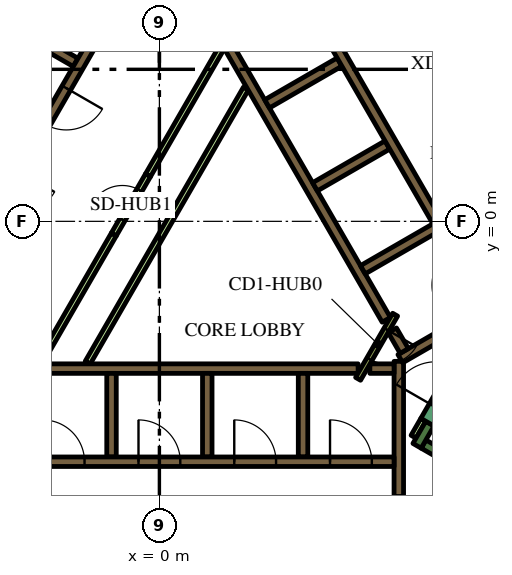
"""IFC4 building model, lengths in metres.
Left out: names, types, materials, properties, quantities, classifications, styles, units other than length and angle.
Written with IfcOpenShell. Run it as: python <this file> out.ifc"""

import sys

from ifc_helpers import new_model, si_unit, direction, frame, frame_2d, origin, place, context, subcontext, project, spatial, rectangle, extrude, element, fill, save


model = new_model("IFC4")
c1 = context("Model", 3, precision=1e-05, world=origin(), true_north=direction((0.0, 1.0)))
c2 = subcontext(c1, "Body", "Model", "MODEL_VIEW")
j1 = project(units=[si_unit("LENGTHUNIT", "METRE"), si_unit("PLANEANGLEUNIT", "RADIAN")], contexts=[c1])
p1 = place(None, origin())
s1 = spatial("IfcSite", under=j1, at=p1, CompositionType="ELEMENT")
p2 = place(p1, origin())
s2 = spatial("IfcBuilding", under=s1, at=p2, CompositionType="ELEMENT")
p3 = place(p2, frame((0.0, 0.0, 145.8)))
s3 = spatial("IfcBuildingStorey", under=s2, at=p3, CompositionType="ELEMENT", Elevation=145.8)
p4 = place(p3, frame((12.84, -9.261, 0.0), z_axis=(0.0, 0.0, 1.0), x_axis=(-0.866013990052, 0.500019768644, 0.0)))
e1 = element("IfcWall", 1, at=p4, inside=s3, PredefinedType="SOLIDWALL", context=c2, shape_type="SweptSolid", body=[
    extrude(rectangle(XDim=6.8, YDim=0.25, at=frame_2d((3.4, 0.0))), origin(), (0.0, 0.0, 1.0), 4.2),
])
p5 = place(p3, frame((6.78, -5.906, 0.0), z_axis=(0.0, 0.0, 1.0), x_axis=(0.500223362819, 0.865896406789, 0.0)))
e2 = element("IfcWall", 2, at=p5, inside=s3, PredefinedType="SOLIDWALL", context=c2, shape_type="SweptSolid", body=[
    extrude(rectangle(XDim=0.675, YDim=0.25, at=frame_2d((0.337, 0.0))), origin(), (0.0, 0.0, 1.0), 4.2),
])
p6 = place(p3, frame((-5.259, -3.875, 0.0), z_axis=(0.0, 0.0, 1.0), x_axis=(1.0, 0.0, 0.0)))
e3 = element("IfcWall", 3, at=p6, inside=s3, PredefinedType="SOLIDWALL", context=c2, shape_type="SweptSolid", body=[
    extrude(rectangle(XDim=10.489, YDim=0.25, at=frame_2d((5.244, 0.0))), origin(), (0.0, 0.0, 1.0), 4.2),
])
for number, where, z_axis, x_axis in (
    (4, (3.78, -4.0, 0.0), (0.0, 0.0, 1.0), (0.0, -1.0, 0.0)),
    (5, (1.26, -4.0, 0.0), (0.0, 0.0, 1.0), (0.0, -1.0, 0.0)),
    (6, (-1.26, -4.0, 0.0), (0.0, 0.0, 1.0), (0.0, -1.0, 0.0)),
):
    element("IfcWall", number, at=place(p3, frame(where, z_axis=z_axis, x_axis=x_axis)), inside=s3, PredefinedType="SOLIDWALL", context=c2, shape_type="SweptSolid", body=[
        extrude(rectangle(XDim=2.2, YDim=0.25, at=frame_2d((1.1, 0.0))), origin(), (0.0, 0.0, 1.0), 4.2),
    ])
p7 = place(p3, frame((6.3, -7.24, 0.0), z_axis=(0.0, 0.0, 1.0), x_axis=(0.0, 1.0, 0.0)))
e7 = element("IfcWall", 7, at=p7, inside=s3, PredefinedType="SOLIDWALL", context=c2, shape_type="SweptSolid", body=[
    extrude(rectangle(XDim=3.556, YDim=0.25, at=frame_2d((1.778, 0.0))), origin(), (0.0, 0.0, 1.0), 4.2),
])
p8 = place(p3, frame((5.538, -3.875, 0.0), z_axis=(0.0, 0.0, 1.0), x_axis=(1.0, 0.0, 0.0)))
e8 = element("IfcWall", 8, at=p8, inside=s3, PredefinedType="SOLIDWALL", context=c2, shape_type="SweptSolid", body=[
    extrude(rectangle(XDim=0.637, YDim=0.25, at=frame_2d((0.318, 0.0))), origin(), (0.0, 0.0, 1.0), 4.2),
])
p9 = place(p3, frame((9.19, -1.969, 0.0), z_axis=(0.0, 0.0, 1.0), x_axis=(-0.866057109641, -0.499945079824, 0.0)))
e9 = element("IfcWall", 9, at=p9, inside=s3, PredefinedType="SOLIDWALL", context=c2, shape_type="SweptSolid", body=[
    extrude(rectangle(XDim=3.291, YDim=0.25, at=frame_2d((1.646, 0.0))), origin(), (0.0, 0.0, 1.0), 4.2),
])
p10 = place(p3, frame((6.13, -2.867, 0.0), z_axis=(0.0, 0.0, 1.0), x_axis=(0.500160776593, -0.865932559475, 0.0)))
e10 = element("IfcWall", 10, at=p10, inside=s3, PredefinedType="SOLIDWALL", context=c2, shape_type="SweptSolid", body=[
    extrude(rectangle(XDim=0.627, YDim=0.25, at=frame_2d((0.313, 0.0))), origin(), (0.0, 0.0, 1.0), 4.2),
])
p11 = place(p3, frame((5.97, -2.591, 0.0), z_axis=(0.0, 0.0, 1.0), x_axis=(-0.499994469932, 0.866028596547, 0.0)))
e11 = element("IfcWall", 11, at=p11, inside=s3, PredefinedType="SOLIDWALL", context=c2, shape_type="SweptSolid", body=[
    extrude(rectangle(XDim=10.488, YDim=0.25, at=frame_2d((5.244, 0.0))), origin(), (0.0, 0.0, 1.0), 4.2),
])
for number, where, z_axis, x_axis in (
    (12, (2.834, 3.091, 0.0), (0.0, 0.0, 1.0), (0.866, 0.5, 0.0)),
    (13, (4.094, 0.909, 0.0), (0.0, 0.0, 1.0), (0.866, 0.5, 0.0)),
    (14, (5.354, -1.274, 0.0), (0.0, 0.0, 1.0), (0.866, 0.5, 0.0)),
):
    element("IfcWall", number, at=place(p3, frame(where, z_axis=z_axis, x_axis=x_axis)), inside=s3, PredefinedType="SOLIDWALL", context=c2, shape_type="SweptSolid", body=[
        extrude(rectangle(XDim=2.2, YDim=0.25, at=frame_2d((1.1, 0.0))), origin(), (0.0, 0.0, 1.0), 4.2),
    ])
p12 = place(p3, frame((-8.06, -1.311, 0.0), z_axis=(0.0, 0.0, 1.0), x_axis=(0.50000273126, 0.866023826885, 0.0)))
e15 = element("IfcWall", 15, at=p12, inside=s3, PredefinedType="SOLIDWALL", context=c2, shape_type="SweptSolid", body=[
    extrude(rectangle(XDim=10.33, YDim=0.25, at=frame_2d((5.165, 0.0))), origin(), (0.0, 0.0, 1.0), 4.2),
])
p13 = place(p3, frame((-2.204, 4.182, 0.0), z_axis=(0.0, 0.0, 1.0), x_axis=(-0.866008176907, 0.50002983664, 0.0)))
e16 = element("IfcWall", 16, at=p13, inside=s3, PredefinedType="SOLIDWALL", context=c2, shape_type="SweptSolid", body=[
    extrude(rectangle(XDim=2.2, YDim=0.25, at=frame_2d((1.1, 0.0))), origin(), (0.0, 0.0, 1.0), 4.2),
])
p14 = place(p3, frame((6.945, -5.222, 0.0), z_axis=(0.0, 0.0, 1.0), x_axis=(-0.499818422106, -0.866130212453, 0.0)))
e17 = element("IfcWall", 17, at=p14, inside=s3, PredefinedType="PARTITIONING", context=c2, shape_type="SweptSolid", body=[
    extrude(rectangle(XDim=0.514, YDim=0.15, at=frame_2d((0.257, 0.0))), origin(), (0.0, 0.0, 1.0), 3.15),
])
p15 = place(p3, frame((-1.887, -3.718, 0.0), z_axis=(0.0, 0.0, 1.0), x_axis=(0.500005008002, 0.866022512394, 0.0)))
e18 = element("IfcWall", 18, at=p15, inside=s3, PredefinedType="PARTITIONING", context=c2, shape_type="SweptSolid", body=[
    extrude(rectangle(XDim=8.327, YDim=0.15, at=frame_2d((4.164, 0.0))), origin(), (0.0, 0.0, 1.0), 3.15),
])
p16 = place(p3, frame((-3.147, -3.718, 0.0), z_axis=(0.0, 0.0, 1.0), x_axis=(0.500010131483, 0.866019554291, 0.0)))
e19 = element("IfcWall", 19, at=p16, inside=s3, PredefinedType="PARTITIONING", context=c2, shape_type="SweptSolid", body=[
    extrude(rectangle(XDim=3.894, YDim=0.15, at=frame_2d((1.947, 0.0))), origin(), (0.0, 0.0, 1.0), 3.15),
])
p17 = place(p3, frame((-0.3, 1.212, 0.0), z_axis=(0.0, 0.0, 1.0), x_axis=(0.499963101113, 0.866046706318, 0.0)))
e20 = element("IfcWall", 20, at=p17, inside=s3, PredefinedType="PARTITIONING", context=c2, shape_type="SweptSolid", body=[
    extrude(rectangle(XDim=3.893, YDim=0.15, at=frame_2d((1.947, 0.0))), origin(), (0.0, 0.0, 1.0), 3.15),
])
p18 = place(p3, frame((-6.175, -6.325, 0.0), z_axis=(0.0, 0.0, 1.0), x_axis=(1.0, 0.0, 0.0)))
e21 = element("IfcWall", 21, at=p18, inside=s3, PredefinedType="SOLIDWALL", context=c2, shape_type="SweptSolid", body=[
    extrude(rectangle(XDim=12.35, YDim=0.25, at=frame_2d((6.175, 0.0))), origin(), (0.0, 0.0, 1.0), 4.2),
])
p19 = place(p18, frame((0.585, 0.0, 0.0)))
e22 = element("IfcOpeningElement", 22, at=p19, cuts=e21, PredefinedType="OPENING", context=c2, shape_type="SweptSolid", body=[
    extrude(rectangle(XDim=1.1, YDim=2.1, at=frame_2d((0.55, 1.05))), frame((0.0, 0.135, 0.0), z_axis=(0.0, -1.0, 0.0), x_axis=(1.0, 0.0, 0.0)), (0.0, 0.0, 1.0), 0.27),
])
p20 = place(p18, frame((3.105, 0.0, 0.0)))
e23 = element("IfcOpeningElement", 23, at=p20, cuts=e21, PredefinedType="OPENING", context=c2, shape_type="SweptSolid", body=[
    extrude(rectangle(XDim=1.1, YDim=2.1, at=frame_2d((0.55, 1.05))), frame((0.0, 0.135, 0.0), z_axis=(0.0, -1.0, 0.0), x_axis=(1.0, 0.0, 0.0)), (0.0, 0.0, 1.0), 0.27),
])
p21 = place(p18, frame((5.625, 0.0, 0.0)))
e24 = element("IfcOpeningElement", 24, at=p21, cuts=e21, PredefinedType="OPENING", context=c2, shape_type="SweptSolid", body=[
    extrude(rectangle(XDim=1.1, YDim=2.1, at=frame_2d((0.55, 1.05))), frame((0.0, 0.135, 0.0), z_axis=(0.0, -1.0, 0.0), x_axis=(1.0, 0.0, 0.0)), (0.0, 0.0, 1.0), 0.27),
])
p22 = place(p18, frame((8.145, 0.0, 0.0)))
e25 = element("IfcOpeningElement", 25, at=p22, cuts=e21, PredefinedType="OPENING", context=c2, shape_type="SweptSolid", body=[
    extrude(rectangle(XDim=1.1, YDim=2.1, at=frame_2d((0.55, 1.05))), frame((0.0, 0.135, 0.0), z_axis=(0.0, -1.0, 0.0), x_axis=(1.0, 0.0, 0.0)), (0.0, 0.0, 1.0), 0.27),
])
p23 = place(p18, frame((10.665, 0.0, 0.0)))
e26 = element("IfcOpeningElement", 26, at=p23, cuts=e21, PredefinedType="OPENING", context=c2, shape_type="SweptSolid", body=[
    extrude(rectangle(XDim=1.1, YDim=2.1, at=frame_2d((0.55, 1.05))), frame((0.0, 0.135, 0.0), z_axis=(0.0, -1.0, 0.0), x_axis=(1.0, 0.0, 0.0)), (0.0, 0.0, 1.0), 0.27),
])
p24 = place(p3, frame((8.565, -2.185, 0.0), z_axis=(0.0, 0.0, 1.0), x_axis=(-0.499997954832, 0.866026584559, 0.0)))
e27 = element("IfcWall", 27, at=p24, inside=s3, PredefinedType="SOLIDWALL", context=c2, shape_type="SweptSolid", body=[
    extrude(rectangle(XDim=12.35, YDim=0.25, at=frame_2d((6.175, 0.0))), origin(), (0.0, 0.0, 1.0), 4.2),
])
p25 = place(p24, frame((0.585, 0.0, 0.0)))
e28 = element("IfcOpeningElement", 28, at=p25, cuts=e27, PredefinedType="OPENING", context=c2, shape_type="SweptSolid", body=[
    extrude(rectangle(XDim=1.1, YDim=2.1, at=frame_2d((0.55, 1.05))), frame((0.0, 0.135, 0.0), z_axis=(0.0, -1.0, 0.0), x_axis=(1.0, 0.0, 0.0)), (0.0, 0.0, 1.0), 0.27),
])
p26 = place(p3, frame((-0.898, 6.194, 0.0), z_axis=(0.0, 0.0, 1.0), x_axis=(-0.499996202215, -0.866027596426, 0.0)))
e29 = element("IfcWall", 29, at=p26, inside=s3, PredefinedType="SOLIDWALL", context=c2, shape_type="SweptSolid", body=[
    extrude(rectangle(XDim=9.83, YDim=0.25, at=frame_2d((4.915, 0.0))), origin(), (0.0, 0.0, 1.0), 4.2),
])
p27 = place(p26, frame((0.585, 0.0, 0.0)))
e30 = element("IfcOpeningElement", 30, at=p27, cuts=e29, PredefinedType="OPENING", context=c2, shape_type="SweptSolid", body=[
    extrude(rectangle(XDim=1.1, YDim=2.1, at=frame_2d((0.55, 1.05))), frame((0.0, 0.135, 0.0), z_axis=(0.0, -1.0, 0.0), x_axis=(1.0, 0.0, 0.0)), (0.0, 0.0, 1.0), 0.27),
])
p28 = place(p26, frame((3.105, 0.0, 0.0)))
e31 = element("IfcOpeningElement", 31, at=p28, cuts=e29, PredefinedType="OPENING", context=c2, shape_type="SweptSolid", body=[
    extrude(rectangle(XDim=1.1, YDim=2.1, at=frame_2d((0.55, 1.05))), frame((0.0, 0.135, 0.0), z_axis=(0.0, -1.0, 0.0), x_axis=(1.0, 0.0, 0.0)), (0.0, 0.0, 1.0), 0.27),
])
p29 = place(p26, frame((5.625, 0.0, 0.0)))
e32 = element("IfcOpeningElement", 32, at=p29, cuts=e29, PredefinedType="OPENING", context=c2, shape_type="SweptSolid", body=[
    extrude(rectangle(XDim=1.1, YDim=2.1, at=frame_2d((0.55, 1.05))), frame((0.0, 0.135, 0.0), z_axis=(0.0, -1.0, 0.0), x_axis=(1.0, 0.0, 0.0)), (0.0, 0.0, 1.0), 0.27),
])
p30 = place(p26, frame((8.145, 0.0, 0.0)))
e33 = element("IfcOpeningElement", 33, at=p30, cuts=e29, PredefinedType="OPENING", context=c2, shape_type="SweptSolid", body=[
    extrude(rectangle(XDim=1.1, YDim=2.1, at=frame_2d((0.55, 1.05))), frame((0.0, 0.135, 0.0), z_axis=(0.0, -1.0, 0.0), x_axis=(1.0, 0.0, 0.0)), (0.0, 0.0, 1.0), 0.27),
])
p31 = place(p3, frame((7.053, -5.284, 0.0), z_axis=(0.0, 0.0, 1.0), x_axis=(0.500078061341, 0.865980330357, 0.0)))
e34 = element("IfcWall", 34, at=p31, inside=s3, PredefinedType="SOLIDWALL", context=c2, shape_type="SweptSolid", body=[
    extrude(rectangle(XDim=2.1, YDim=0.4, at=frame_2d((1.05, 0.0))), origin(), (0.0, 0.0, 1.0), 4.2),
])
p32 = place(p31, frame((0.45, 0.0, 0.0)))
e35 = element("IfcOpeningElement", 35, at=p32, cuts=e34, PredefinedType="OPENING", context=c2, shape_type="SweptSolid", body=[
    extrude(rectangle(XDim=1.2, YDim=2.1, at=frame_2d((0.6, 1.05))), frame((0.0, 0.21, 0.0), z_axis=(0.0, -1.0, 0.0), x_axis=(1.0, 0.0, 0.0)), (0.0, 0.0, 1.0), 0.42),
])
p33 = place(p3, frame((6.203, -2.456, 0.0), z_axis=(0.0, 0.0, 1.0), x_axis=(-0.500043961785, -0.866000020948, 0.0)))
e36 = element("IfcWall", 36, at=p33, inside=s3, PredefinedType="PARTITIONING", context=c2, shape_type="SweptSolid", body=[
    extrude(rectangle(XDim=1.95, YDim=0.15, at=frame_2d((0.975, 0.0))), origin(), (0.0, 0.0, 1.0), 4.2),
])
p34 = place(p33, frame((0.45, 0.0, 0.0)))
e37 = element("IfcOpeningElement", 37, at=p34, cuts=e36, PredefinedType="OPENING", context=c2, shape_type="SweptSolid", body=[
    extrude(rectangle(XDim=0.9, YDim=2.1, at=frame_2d((0.45, 1.05))), frame((0.0, 0.085, 0.0), z_axis=(0.0, -1.0, 0.0), x_axis=(1.0, 0.0, 0.0)), (0.0, 0.0, 1.0), 0.17),
])
p35 = place(p3, frame((-1.2, -0.346, 0.0), z_axis=(0.0, 0.0, 1.0), x_axis=(0.499961193289, 0.866047807691, 0.0)))
e38 = element("IfcWall", 38, at=p35, inside=s3, PredefinedType="PARTITIONING", context=c2, shape_type="SweptSolid", body=[
    extrude(rectangle(XDim=1.8, YDim=0.15, at=frame_2d((0.9, 0.0))), origin(), (0.0, 0.0, 1.0), 3.15),
])
p36 = place(p35, frame((0.45, 0.0, 0.0)))
e39 = element("IfcOpeningElement", 39, at=p36, cuts=e38, PredefinedType="OPENING", context=c2, shape_type="SweptSolid", body=[
    extrude(rectangle(XDim=0.9, YDim=2.1, at=frame_2d((0.45, 1.05))), frame((0.0, 0.085, 0.0), z_axis=(0.0, -1.0, 0.0), x_axis=(1.0, 0.0, 0.0)), (0.0, 0.0, 1.0), 0.17),
])
p37 = place(p20, origin())
e40 = element("IfcDoor", 40, at=p37, inside=s3, OperationType="DOUBLE_DOOR_SLIDING", PredefinedType="DOOR", context=c2, shape_type="SweptSolid", body=[
    extrude(rectangle(XDim=1.1, YDim=2.1, at=frame_2d((0.55, 1.05))), frame((0.0, 0.025, 0.0), z_axis=(0.0, -1.0, 0.0), x_axis=(1.0, 0.0, 0.0)), (0.0, 0.0, 1.0), 0.05),
])
fill(e23, e40)
p38 = place(p21, origin())
e41 = element("IfcDoor", 41, at=p38, inside=s3, OperationType="DOUBLE_DOOR_SLIDING", PredefinedType="DOOR", context=c2, shape_type="SweptSolid", body=[
    extrude(rectangle(XDim=1.1, YDim=2.1, at=frame_2d((0.55, 1.05))), frame((0.0, 0.025, 0.0), z_axis=(0.0, -1.0, 0.0), x_axis=(1.0, 0.0, 0.0)), (0.0, 0.0, 1.0), 0.05),
])
fill(e24, e41)
p39 = place(p22, origin())
e42 = element("IfcDoor", 42, at=p39, inside=s3, OperationType="DOUBLE_DOOR_SLIDING", PredefinedType="DOOR", context=c2, shape_type="SweptSolid", body=[
    extrude(rectangle(XDim=1.1, YDim=2.1, at=frame_2d((0.55, 1.05))), frame((0.0, 0.025, 0.0), z_axis=(0.0, -1.0, 0.0), x_axis=(1.0, 0.0, 0.0)), (0.0, 0.0, 1.0), 0.05),
])
fill(e25, e42)
p40 = place(p23, origin())
e43 = element("IfcDoor", 43, at=p40, inside=s3, OperationType="DOUBLE_DOOR_SLIDING", PredefinedType="DOOR", context=c2, shape_type="SweptSolid", body=[
    extrude(rectangle(XDim=1.1, YDim=2.1, at=frame_2d((0.55, 1.05))), frame((0.0, 0.025, 0.0), z_axis=(0.0, -1.0, 0.0), x_axis=(1.0, 0.0, 0.0)), (0.0, 0.0, 1.0), 0.05),
])
fill(e26, e43)
p41 = place(p28, origin())
e44 = element("IfcDoor", 44, at=p41, inside=s3, OperationType="DOUBLE_DOOR_SLIDING", PredefinedType="DOOR", context=c2, shape_type="SweptSolid", body=[
    extrude(rectangle(XDim=1.1, YDim=2.1, at=frame_2d((0.55, 1.05))), frame((0.0, 0.025, 0.0), z_axis=(0.0, -1.0, 0.0), x_axis=(1.0, 0.0, 0.0)), (0.0, 0.0, 1.0), 0.05),
])
fill(e31, e44)
p42 = place(p34, origin())
e45 = element("IfcDoor", 45, at=p42, inside=s3, OperationType="SINGLE_SWING_LEFT", PredefinedType="DOOR", context=c2, shape_type="SweptSolid", body=[
    extrude(rectangle(XDim=0.9, YDim=2.1, at=frame_2d((0.45, 1.05))), frame((0.0, 0.025, 0.0), z_axis=(0.0, -1.0, 0.0), x_axis=(1.0, 0.0, 0.0)), (0.0, 0.0, 1.0), 0.05),
])
fill(e37, e45)
p43 = place(p36, origin())
e46 = element("IfcDoor", 46, at=p43, inside=s3, OperationType="SINGLE_SWING_LEFT", PredefinedType="DOOR", context=c2, shape_type="SweptSolid", body=[
    extrude(rectangle(XDim=0.9, YDim=2.1, at=frame_2d((0.45, 1.05))), frame((0.0, 0.025, 0.0), z_axis=(0.0, -1.0, 0.0), x_axis=(1.0, 0.0, 0.0)), (0.0, 0.0, 1.0), 0.05),
])
fill(e39, e46)
save(model, sys.argv[1])
